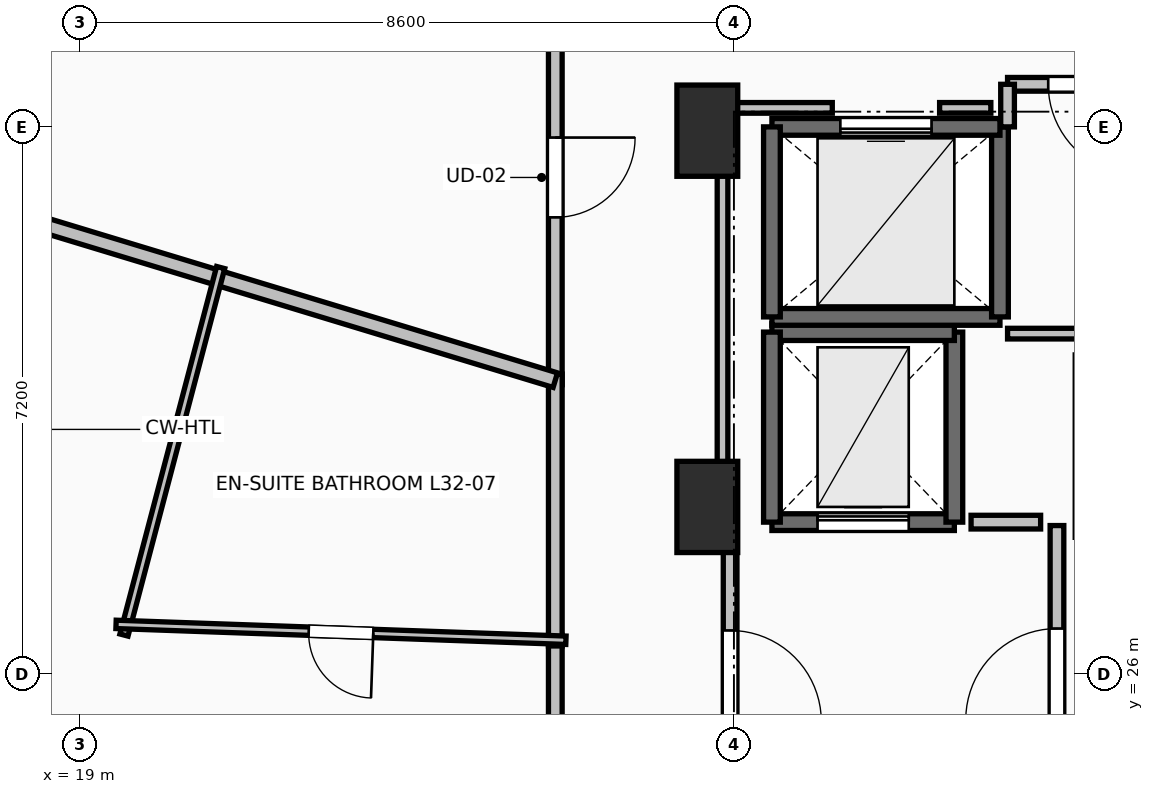
"""IFC4 building model, lengths in metres.
Left out: names, types, materials, properties, quantities, classifications, styles, units other than length and angle.
Written with IfcOpenShell. Run it as: python <this file> out.ifc"""

import sys

from ifc_helpers import new_model, si_unit, direction, frame, frame_2d, origin, origin_2d, place, context, subcontext, project, spatial, rectangle, extrude, element, fill, save


model = new_model("IFC4")
c1 = context("Model", 3, precision=1e-05, world=origin(), true_north=direction((0.0, 1.0)))
c2 = subcontext(c1, "Body", "Model", "MODEL_VIEW")
j1 = project(units=[si_unit("LENGTHUNIT", "METRE"), si_unit("PLANEANGLEUNIT", "RADIAN")], contexts=[c1])
p1 = place(None, origin())
s1 = spatial("IfcSite", under=j1, at=p1, CompositionType="ELEMENT")
p2 = place(p1, origin())
s2 = spatial("IfcBuilding", under=s1, at=p2, CompositionType="ELEMENT")
p3 = place(p2, frame((0.0, 0.0, 120.8)))
s3 = spatial("IfcBuildingStorey", under=s2, at=p3, CompositionType="ELEMENT", Elevation=120.8)
for number, where, z_axis, x_axis in (
    (1, (27.25, 28.2, 0.0), (0.0, 0.0, 1.0), (1.0, 0.0, 0.0)),
    (2, (27.25, 33.15, 0.0), (0.0, 0.0, 1.0), (1.0, 0.0, 0.0)),
):
    element("IfcColumn", number, at=place(p3, frame(where, z_axis=z_axis, x_axis=x_axis)), inside=s3, PredefinedType="PILASTER", context=c2, shape_type="SweptSolid", body=[
        extrude(rectangle(XDim=0.8, YDim=1.2, at=origin_2d()), origin(), (0.0, 0.0, 1.0), 3.5),
    ])
p4 = place(p3, frame((28.1, 28.0, 0.0), z_axis=(0.0, 0.0, 1.0), x_axis=(1.0, 0.0, 0.0)))
e3 = element("IfcWall", 3, at=p4, inside=s3, PredefinedType="SHEAR", context=c2, shape_type="SweptSolid", body=[
    extrude(rectangle(XDim=2.4, YDim=0.22, at=frame_2d((1.2, 0.0))), origin(), (0.0, 0.0, 1.0), 3.15),
])
p5 = place(p4, frame((0.6, 0.0, 0.0)))
e4 = element("IfcOpeningElement", 4, at=p5, cuts=e3, PredefinedType="OPENING", context=c2, shape_type="SweptSolid", body=[
    extrude(rectangle(XDim=1.2, YDim=2.2, at=frame_2d((0.6, 1.1))), frame((0.0, 0.125, 0.0), z_axis=(0.0, -1.0, 0.0), x_axis=(1.0, 0.0, 0.0)), (0.0, 0.0, 1.0), 0.25),
])
p6 = place(p3, frame((30.5, 28.0, 0.0), z_axis=(0.0, 0.0, 1.0), x_axis=(0.0, 1.0, 0.0)))
e5 = element("IfcWall", 5, at=p6, inside=s3, PredefinedType="SHEAR", context=c2, shape_type="SweptSolid", body=[
    extrude(rectangle(XDim=2.5, YDim=0.22, at=frame_2d((1.25, 0.0))), origin(), (0.0, 0.0, 1.0), 3.15),
])
p7 = place(p3, frame((30.5, 30.5, 0.0), z_axis=(0.0, 0.0, 1.0), x_axis=(-1.0, 0.0, 0.0)))
e6 = element("IfcWall", 6, at=p7, inside=s3, PredefinedType="SHEAR", context=c2, shape_type="SweptSolid", body=[
    extrude(rectangle(XDim=2.4, YDim=0.22, at=frame_2d((1.2, 0.0))), origin(), (0.0, 0.0, 1.0), 3.15),
])
p8 = place(p3, frame((28.1, 30.5, 0.0), z_axis=(0.0, 0.0, 1.0), x_axis=(0.0, -1.0, 0.0)))
e7 = element("IfcWall", 7, at=p8, inside=s3, PredefinedType="SHEAR", context=c2, shape_type="SweptSolid", body=[
    extrude(rectangle(XDim=2.5, YDim=0.22, at=frame_2d((1.25, 0.0))), origin(), (0.0, 0.0, 1.0), 3.15),
])
p9 = place(p3, frame((28.1, 30.7, 0.0), z_axis=(0.0, 0.0, 1.0), x_axis=(1.0, 0.0, 0.0)))
e8 = element("IfcWall", 8, at=p9, inside=s3, PredefinedType="SOLIDWALL", context=c2, shape_type="SweptSolid", body=[
    extrude(rectangle(XDim=3.0, YDim=0.22, at=frame_2d((1.5, 0.0))), origin(), (0.0, 0.0, 1.0), 3.15),
])
p10 = place(p3, frame((31.1, 30.7, 0.0), z_axis=(0.0, 0.0, 1.0), x_axis=(0.0, 1.0, 0.0)))
e9 = element("IfcWall", 9, at=p10, inside=s3, PredefinedType="SOLIDWALL", context=c2, shape_type="SweptSolid", body=[
    extrude(rectangle(XDim=2.5, YDim=0.22, at=frame_2d((1.25, 0.0))), origin(), (0.0, 0.0, 1.0), 3.15),
])
p11 = place(p3, frame((31.1, 33.2, 0.0), z_axis=(0.0, 0.0, 1.0), x_axis=(-1.0, 0.0, 0.0)))
e10 = element("IfcWall", 10, at=p11, inside=s3, PredefinedType="SOLIDWALL", context=c2, shape_type="SweptSolid", body=[
    extrude(rectangle(XDim=3.0, YDim=0.22, at=frame_2d((1.5, 0.0))), origin(), (0.0, 0.0, 1.0), 3.15),
])
p12 = place(p11, frame((0.9, 0.0, 0.0)))
e11 = element("IfcOpeningElement", 11, at=p12, cuts=e10, PredefinedType="OPENING", context=c2, shape_type="SweptSolid", body=[
    extrude(rectangle(XDim=1.2, YDim=2.2, at=frame_2d((0.6, 1.1))), frame((0.0, 0.125, 0.0), z_axis=(0.0, -1.0, 0.0), x_axis=(1.0, 0.0, 0.0)), (0.0, 0.0, 1.0), 0.25),
])
p13 = place(p3, frame((28.1, 33.2, 0.0), z_axis=(0.0, 0.0, 1.0), x_axis=(0.0, -1.0, 0.0)))
e12 = element("IfcWall", 12, at=p13, inside=s3, PredefinedType="SOLIDWALL", context=c2, shape_type="SweptSolid", body=[
    extrude(rectangle(XDim=2.5, YDim=0.22, at=frame_2d((1.25, 0.0))), origin(), (0.0, 0.0, 1.0), 3.15),
])
p14 = place(p3, frame((31.85, 24.045, 0.0), z_axis=(0.0, 0.0, 1.0), x_axis=(0.0, 1.0, 0.0)))
e13 = element("IfcWall", 13, at=p14, inside=s3, PredefinedType="PARTITIONING", context=c2, shape_type="SweptSolid", body=[
    extrude(rectangle(XDim=3.91, YDim=0.18, at=frame_2d((1.955, 0.0))), origin(), (0.0, 0.0, 1.0), 3.15),
])
p15 = place(p14, frame((1.355, 0.0, 0.0)))
e14 = element("IfcOpeningElement", 14, at=p15, cuts=e13, PredefinedType="OPENING", context=c2, shape_type="SweptSolid", body=[
    extrude(rectangle(XDim=1.2, YDim=2.15, at=frame_2d((0.6, 1.075))), frame((0.0, 0.105, 0.0), z_axis=(0.0, -1.0, 0.0), x_axis=(1.0, 0.0, 0.0)), (0.0, 0.0, 1.0), 0.21),
])
p16 = place(p3, frame((27.55, 28.0, 0.0), z_axis=(0.0, 0.0, 1.0), x_axis=(0.0, -1.0, 0.0)))
e15 = element("IfcWall", 15, at=p16, inside=s3, PredefinedType="PARTITIONING", context=c2, shape_type="SweptSolid", body=[
    extrude(rectangle(XDim=4.05, YDim=0.18, at=frame_2d((2.025, 0.0))), origin(), (0.0, 0.0, 1.0), 3.15),
])
p17 = place(p16, frame((1.425, 0.0, 0.0)))
e16 = element("IfcOpeningElement", 16, at=p17, cuts=e15, PredefinedType="OPENING", context=c2, shape_type="SweptSolid", body=[
    extrude(rectangle(XDim=1.2, YDim=2.15, at=frame_2d((0.6, 1.075))), frame((0.0, 0.105, 0.0), z_axis=(0.0, -1.0, 0.0), x_axis=(1.0, 0.0, 0.0)), (0.0, 0.0, 1.0), 0.21),
])
p18 = place(p3, frame((33.47, 33.76, 0.0), z_axis=(0.0, 0.0, 1.0), x_axis=(-1.0, 0.0, 0.0)))
e17 = element("IfcWall", 17, at=p18, inside=s3, PredefinedType="PARTITIONING", context=c2, shape_type="SweptSolid", body=[
    extrude(rectangle(XDim=2.27, YDim=0.18, at=frame_2d((1.135, 0.0))), origin(), (0.0, 0.0, 1.0), 3.15),
])
p19 = place(p18, frame((0.535, 0.0, 0.0)))
e18 = element("IfcOpeningElement", 18, at=p19, cuts=e17, PredefinedType="OPENING", context=c2, shape_type="SweptSolid", body=[
    extrude(rectangle(XDim=1.2, YDim=2.15, at=frame_2d((0.6, 1.075))), frame((0.0, 0.105, 0.0), z_axis=(0.0, -1.0, 0.0), x_axis=(1.0, 0.0, 0.0)), (0.0, 0.0, 1.0), 0.21),
])
p20 = place(p3, frame((31.2, 33.76, 0.0), z_axis=(0.0, 0.0, 1.0), x_axis=(0.0, -1.0, 0.0)))
e19 = element("IfcWall", 19, at=p20, inside=s3, PredefinedType="PARTITIONING", context=c2, shape_type="SweptSolid", body=[
    extrude(rectangle(XDim=0.56, YDim=0.18, at=frame_2d((0.28, 0.0))), origin(), (0.0, 0.0, 1.0), 3.15),
])
p21 = place(p3, frame((25.25, 35.261, 0.0), z_axis=(0.0, 0.0, 1.0), x_axis=(0.0, -1.0, 0.0)))
e20 = element("IfcWall", 20, at=p21, inside=s3, PredefinedType="PARTITIONING", context=c2, shape_type="SweptSolid", body=[
    extrude(rectangle(XDim=5.453, YDim=0.18, at=frame_2d((2.727, 0.0))), origin(), (0.0, 0.0, 1.0), 2.342),
])
p22 = place(p21, frame((2.201, 0.0, 0.0)))
e21 = element("IfcOpeningElement", 21, at=p22, cuts=e20, PredefinedType="OPENING", context=c2, shape_type="SweptSolid", body=[
    extrude(rectangle(XDim=1.05, YDim=2.2, at=frame_2d((0.525, 1.1))), frame((0.0, 0.105, 0.0), z_axis=(0.0, -1.0, 0.0), x_axis=(1.0, 0.0, 0.0)), (0.0, 0.0, 1.0), 0.21),
])
p23 = place(p3, frame((25.25, 26.511, 0.0), z_axis=(0.0, 0.0, 1.0), x_axis=(0.0, -1.0, 0.0)))
e22 = element("IfcWall", 22, at=p23, inside=s3, PredefinedType="PARTITIONING", context=c2, shape_type="SweptSolid", body=[
    extrude(rectangle(XDim=4.442, YDim=0.18, at=frame_2d((2.221, 0.0))), origin(), (0.0, 0.0, 1.0), 3.15),
])
p24 = place(p23, frame((1.696, 0.0, 0.0)))
e23 = element("IfcOpeningElement", 23, at=p24, cuts=e22, PredefinedType="OPENING", context=c2, shape_type="SweptSolid", body=[
    extrude(rectangle(XDim=1.05, YDim=2.2, at=frame_2d((0.525, 1.1))), frame((0.0, 0.105, 0.0), z_axis=(0.0, -1.0, 0.0), x_axis=(1.0, 0.0, 0.0)), (0.0, 0.0, 1.0), 0.21),
])
p25 = place(p3, frame((25.25, 29.948, 0.0), z_axis=(0.0, 0.0, 1.0), x_axis=(0.0, -1.0, 0.0)))
e24 = element("IfcWall", 24, at=p25, inside=s3, PredefinedType="PARTITIONING", context=c2, shape_type="SweptSolid", body=[
    extrude(rectangle(XDim=3.577, YDim=0.18, at=frame_2d((1.789, 0.0))), origin(), (0.0, 0.0, 1.0), 2.342),
])
p26 = place(p3, frame((13.663, 33.383, 0.0), z_axis=(0.0, 0.0, 1.0), x_axis=(0.956933802543, -0.290306213422, 0.0)))
e25 = element("IfcWall", 25, at=p26, inside=s3, PredefinedType="PARTITIONING", context=c2, shape_type="SweptSolid", body=[
    extrude(rectangle(XDim=12.108, YDim=0.2, at=frame_2d((6.054, 0.0))), origin(), (0.0, 0.0, 1.0), 2.342),
])
p27 = place(p3, frame((19.575, 26.515, 0.0), z_axis=(0.0, 0.0, 1.0), x_axis=(0.254478876497, 0.967078332617, 0.0)))
e26 = element("IfcWall", 26, at=p27, inside=s3, PredefinedType="PARTITIONING", context=c2, shape_type="SweptSolid", body=[
    extrude(rectangle(XDim=4.999, YDim=0.11, at=frame_2d((2.5, 0.0))), origin(), (0.0, 0.0, 1.0), 2.342),
])
p28 = place(p3, frame((25.39, 26.446, 0.0), z_axis=(0.0, 0.0, 1.0), x_axis=(-0.999378666741, 0.03524599926, 0.0)))
e27 = element("IfcWall", 27, at=p28, inside=s3, PredefinedType="PARTITIONING", context=c2, shape_type="SweptSolid", body=[
    extrude(rectangle(XDim=5.922, YDim=0.11, at=frame_2d((2.961, 0.0))), origin(), (0.0, 0.0, 1.0), 2.342),
])
p29 = place(p28, frame((2.536, 0.0, 0.0)))
e28 = element("IfcOpeningElement", 28, at=p29, cuts=e27, PredefinedType="OPENING", context=c2, shape_type="SweptSolid", body=[
    extrude(rectangle(XDim=0.85, YDim=2.1, at=frame_2d((0.425, 1.05))), frame((0.0, 0.07, 0.0), z_axis=(0.0, -1.0, 0.0), x_axis=(1.0, 0.0, 0.0)), (0.0, 0.0, 1.0), 0.14),
])
p30 = place(p3, frame((31.635, 28.0, 0.0), z_axis=(0.0, 0.0, 1.0), x_axis=(-1.0, 0.0, 0.0)))
e29 = element("IfcWall", 29, at=p30, inside=s3, PredefinedType="PARTITIONING", context=c2, shape_type="SweptSolid", body=[
    extrude(rectangle(XDim=0.915, YDim=0.18, at=frame_2d((0.458, 0.0))), origin(), (0.0, 0.0, 1.0), 3.15),
])
p31 = place(p3, frame((31.2, 30.48, 0.0), z_axis=(0.0, 0.0, 1.0), x_axis=(1.0, 0.0, 0.0)))
e30 = element("IfcWall", 30, at=p31, inside=s3, PredefinedType="PARTITIONING", context=c2, shape_type="SweptSolid", body=[
    extrude(rectangle(XDim=2.05, YDim=0.14, at=frame_2d((1.025, 0.0))), origin(), (0.0, 0.0, 1.0), 3.15),
])
p32 = place(p3, frame((27.45, 28.196, 0.0), z_axis=(0.0, 0.0, 1.0), x_axis=(0.0, 1.0, 0.0)))
e31 = element("IfcWall", 31, at=p32, inside=s3, PredefinedType="PARTITIONING", context=c2, shape_type="SweptSolid", body=[
    extrude(rectangle(XDim=5.254, YDim=0.14, at=frame_2d((2.627, 0.0))), origin(), (0.0, 0.0, 1.0), 2.342),
])
p33 = place(p3, frame((27.45, 33.45, 0.0), z_axis=(0.0, 0.0, 1.0), x_axis=(1.0, 0.0, 0.0)))
e32 = element("IfcWall", 32, at=p33, inside=s3, PredefinedType="PARTITIONING", context=c2, shape_type="SweptSolid", body=[
    extrude(rectangle(XDim=1.444, YDim=0.14, at=frame_2d((0.722, 0.0))), origin(), (0.0, 0.0, 1.0), 2.342),
])
p34 = place(p3, frame((30.306, 33.45, 0.0), z_axis=(0.0, 0.0, 1.0), x_axis=(1.0, 0.0, 0.0)))
e33 = element("IfcWall", 33, at=p34, inside=s3, PredefinedType="PARTITIONING", context=c2, shape_type="SweptSolid", body=[
    extrude(rectangle(XDim=0.674, YDim=0.14, at=frame_2d((0.337, 0.0))), origin(), (0.0, 0.0, 1.0), 3.15),
])
p35 = place(p5, origin())
e34 = element("IfcDoor", 34, at=p35, inside=s3, OperationType="SLIDING_TO_LEFT", PredefinedType="DOOR", context=c2, shape_type="SweptSolid", body=[
    extrude(rectangle(XDim=1.2, YDim=2.2, at=frame_2d((0.6, 1.1))), frame((0.0, 0.025, 0.0), z_axis=(0.0, -1.0, 0.0), x_axis=(1.0, 0.0, 0.0)), (0.0, 0.0, 1.0), 0.05),
])
fill(e4, e34)
p36 = place(p12, origin())
e35 = element("IfcDoor", 35, at=p36, inside=s3, OperationType="SLIDING_TO_LEFT", PredefinedType="DOOR", context=c2, shape_type="SweptSolid", body=[
    extrude(rectangle(XDim=1.2, YDim=2.2, at=frame_2d((0.6, 1.1))), frame((0.0, 0.025, 0.0), z_axis=(0.0, -1.0, 0.0), x_axis=(1.0, 0.0, 0.0)), (0.0, 0.0, 1.0), 0.05),
])
fill(e11, e35)
p37 = place(p15, origin())
e36 = element("IfcDoor", 36, at=p37, inside=s3, OperationType="SINGLE_SWING_LEFT", PredefinedType="DOOR", context=c2, shape_type="SweptSolid", body=[
    extrude(rectangle(XDim=1.2, YDim=2.15, at=frame_2d((0.6, 1.075))), frame((0.0, 0.025, 0.0), z_axis=(0.0, -1.0, 0.0), x_axis=(1.0, 0.0, 0.0)), (0.0, 0.0, 1.0), 0.05),
])
fill(e14, e36)
p38 = place(p17, origin())
e37 = element("IfcDoor", 37, at=p38, inside=s3, OperationType="SINGLE_SWING_RIGHT", PredefinedType="DOOR", context=c2, shape_type="SweptSolid", body=[
    extrude(rectangle(XDim=1.2, YDim=2.15, at=frame_2d((0.6, 1.075))), frame((0.0, 0.025, 0.0), z_axis=(0.0, -1.0, 0.0), x_axis=(1.0, 0.0, 0.0)), (0.0, 0.0, 1.0), 0.05),
])
fill(e16, e37)
p39 = place(p19, origin())
e38 = element("IfcDoor", 38, at=p39, inside=s3, OperationType="SINGLE_SWING_LEFT", PredefinedType="DOOR", context=c2, shape_type="SweptSolid", body=[
    extrude(rectangle(XDim=1.2, YDim=2.15, at=frame_2d((0.6, 1.075))), frame((0.0, 0.025, 0.0), z_axis=(0.0, -1.0, 0.0), x_axis=(1.0, 0.0, 0.0)), (0.0, 0.0, 1.0), 0.05),
])
fill(e18, e38)
p40 = place(p22, origin())
e39 = element("IfcDoor", 39, at=p40, inside=s3, OperationType="SINGLE_SWING_LEFT", PredefinedType="DOOR", context=c2, shape_type="SweptSolid", body=[
    extrude(rectangle(XDim=1.05, YDim=2.2, at=frame_2d((0.525, 1.1))), frame((0.0, 0.025, 0.0), z_axis=(0.0, -1.0, 0.0), x_axis=(1.0, 0.0, 0.0)), (0.0, 0.0, 1.0), 0.05),
])
fill(e21, e39)
p41 = place(p29, origin())
e40 = element("IfcDoor", 40, at=p41, inside=s3, OperationType="SINGLE_SWING_LEFT", PredefinedType="DOOR", context=c2, shape_type="SweptSolid", body=[
    extrude(rectangle(XDim=0.85, YDim=2.1, at=frame_2d((0.425, 1.05))), frame((0.0, 0.025, 0.0), z_axis=(0.0, -1.0, 0.0), x_axis=(1.0, 0.0, 0.0)), (0.0, 0.0, 1.0), 0.05),
])
fill(e28, e40)
save(model, sys.argv[1])
